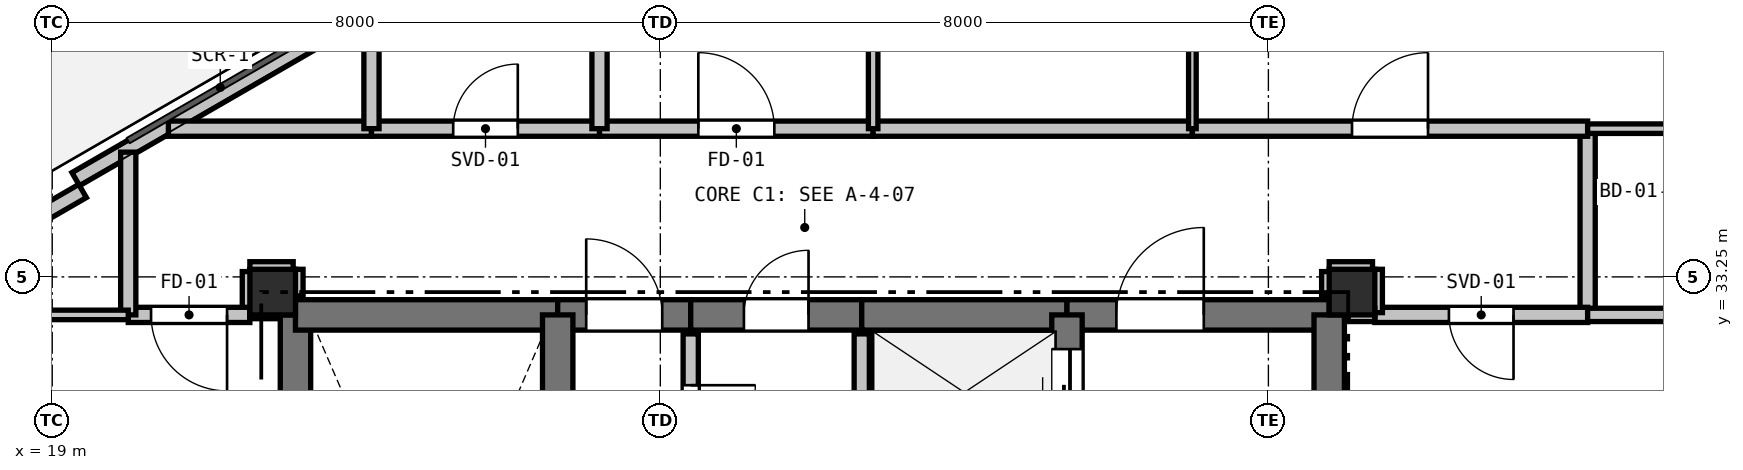
"""IFC4 building model, lengths in metres.
Left out: names, types, materials, properties, quantities, classifications, styles, units other than length and angle.
Written with IfcOpenShell. Run it as: python <this file> out.ifc"""

import sys

from ifc_helpers import new_model, si_unit, direction, frame, frame_2d, origin, origin_2d, place, context, subcontext, project, spatial, rectangle, extrude, element, fill, save


model = new_model("IFC4")
c1 = context("Model", 3, precision=1e-05, world=origin(), true_north=direction((0.0, 1.0)))
c2 = subcontext(c1, "Body", "Model", "MODEL_VIEW")
j1 = project(units=[si_unit("LENGTHUNIT", "METRE"), si_unit("PLANEANGLEUNIT", "RADIAN")], contexts=[c1])
p1 = place(None, origin())
s1 = spatial("IfcSite", under=j1, at=p1, CompositionType="ELEMENT")
p2 = place(p1, origin())
s2 = spatial("IfcBuilding", under=s1, at=p2, CompositionType="ELEMENT")
p3 = place(p2, frame((0.0, 0.0, 215.1)))
s3 = spatial("IfcBuildingStorey", under=s2, at=p3, CompositionType="ELEMENT", Elevation=215.1)
for number, where, z_axis, x_axis in (
    (1, (21.9, 33.05, 0.0), (0.0, 0.0, 1.0), (1.0, 0.0, 0.0)),
    (2, (36.1, 33.05, 0.0), (0.0, 0.0, 1.0), (1.0, 0.0, 0.0)),
):
    element("IfcColumn", number, at=place(p3, frame(where, z_axis=z_axis, x_axis=x_axis)), inside=s3, PredefinedType="COLUMN", context=c2, shape_type="SweptSolid", body=[
        extrude(rectangle(XDim=0.6, YDim=0.6, at=origin_2d()), origin(), (0.0, 0.0, 1.0), 3.3),
    ])
p4 = place(p3, frame((19.309, 34.536, 0.0), z_axis=(0.0, 0.0, 1.0), x_axis=(0.866020680503, 0.500008180874, 0.0)))
e3 = element("IfcWall", 3, at=p4, inside=s3, PredefinedType="PARAPET", context=c2, shape_type="SweptSolid", body=[
    extrude(rectangle(XDim=8.999, YDim=0.2, at=frame_2d((4.5, 0.0))), origin(), (0.0, 0.0, 1.0), 0.2),
])
p5 = place(p3, frame((17.927, 33.53, 0.0), z_axis=(0.0, 0.0, 1.0), x_axis=(0.86605165483, 0.499954529098, 0.0)))
e4 = element("IfcWall", 4, at=p5, inside=s3, PredefinedType="PARAPET", context=c2, shape_type="SweptSolid", body=[
    extrude(rectangle(XDim=1.7, YDim=0.2, at=frame_2d((0.85, 0.0))), origin(), (0.0, 0.0, 1.0), 2.64),
])
p6 = place(p3, frame((22.2, 25.4, 0.0), z_axis=(0.0, 0.0, 1.0), x_axis=(0.0, 1.0, 0.0)))
e5 = element("IfcWall", 5, at=p6, inside=s3, PredefinedType="SHEAR", context=c2, shape_type="SweptSolid", body=[
    extrude(rectangle(XDim=7.35, YDim=0.4, at=frame_2d((3.675, 0.0))), origin(), (0.0, 0.0, 1.0), 3.02),
])
p7 = place(p3, frame((22.2, 32.75, 0.0), z_axis=(0.0, 0.0, 1.0), x_axis=(1.0, 0.0, 0.0)))
e6 = element("IfcWall", 6, at=p7, inside=s3, PredefinedType="SHEAR", context=c2, shape_type="SweptSolid", body=[
    extrude(rectangle(XDim=3.45, YDim=0.4, at=frame_2d((1.725, 0.0))), origin(), (0.0, 0.0, 1.0), 3.02),
])
p8 = place(p3, frame((25.65, 32.75, 0.0), z_axis=(0.0, 0.0, 1.0), x_axis=(1.0, 0.0, 0.0)))
e7 = element("IfcWall", 7, at=p8, inside=s3, PredefinedType="SHEAR", context=c2, shape_type="SweptSolid", body=[
    extrude(rectangle(XDim=1.75, YDim=0.4, at=frame_2d((0.875, 0.0))), origin(), (0.0, 0.0, 1.0), 3.02),
])
p9 = place(p8, frame((0.375, 0.0, 0.0)))
e8 = element("IfcOpeningElement", 8, at=p9, cuts=e7, PredefinedType="OPENING", context=c2, shape_type="SweptSolid", body=[
    extrude(rectangle(XDim=1.0, YDim=2.15, at=frame_2d((0.5, 1.075))), frame((0.0, 0.21, 0.0), z_axis=(0.0, -1.0, 0.0), x_axis=(1.0, 0.0, 0.0)), (0.0, 0.0, 1.0), 0.42),
])
p10 = place(p3, frame((27.4, 32.75, 0.0), z_axis=(0.0, 0.0, 1.0), x_axis=(1.0, 0.0, 0.0)))
e9 = element("IfcWall", 9, at=p10, inside=s3, PredefinedType="SHEAR", context=c2, shape_type="SweptSolid", body=[
    extrude(rectangle(XDim=2.25, YDim=0.4, at=frame_2d((1.125, 0.0))), origin(), (0.0, 0.0, 1.0), 3.02),
])
p11 = place(p10, frame((0.7, 0.0, 0.0)))
e10 = element("IfcOpeningElement", 10, at=p11, cuts=e9, PredefinedType="OPENING", context=c2, shape_type="SweptSolid", body=[
    extrude(rectangle(XDim=0.85, YDim=2.1, at=frame_2d((0.425, 1.05))), frame((0.0, 0.21, 0.0), z_axis=(0.0, -1.0, 0.0), x_axis=(1.0, 0.0, 0.0)), (0.0, 0.0, 1.0), 0.42),
])
p12 = place(p3, frame((29.65, 32.75, 0.0), z_axis=(0.0, 0.0, 1.0), x_axis=(1.0, 0.0, 0.0)))
e11 = element("IfcWall", 11, at=p12, inside=s3, PredefinedType="SHEAR", context=c2, shape_type="SweptSolid", body=[
    extrude(rectangle(XDim=2.7, YDim=0.4, at=frame_2d((1.35, 0.0))), origin(), (0.0, 0.0, 1.0), 3.02),
])
p13 = place(p3, frame((32.35, 32.75, 0.0), z_axis=(0.0, 0.0, 1.0), x_axis=(1.0, 0.0, 0.0)))
e12 = element("IfcWall", 12, at=p13, inside=s3, PredefinedType="SHEAR", context=c2, shape_type="SweptSolid", body=[
    extrude(rectangle(XDim=3.45, YDim=0.4, at=frame_2d((1.725, 0.0))), origin(), (0.0, 0.0, 1.0), 3.02),
])
p14 = place(p13, frame((0.65, 0.0, 0.0)))
e13 = element("IfcOpeningElement", 13, at=p14, cuts=e12, PredefinedType="OPENING", context=c2, shape_type="SweptSolid", body=[
    extrude(rectangle(XDim=1.15, YDim=2.15, at=frame_2d((0.575, 1.075))), frame((0.0, 0.21, 0.0), z_axis=(0.0, -1.0, 0.0), x_axis=(1.0, 0.0, 0.0)), (0.0, 0.0, 1.0), 0.42),
])
p15 = place(p3, frame((35.8, 32.75, 0.0), z_axis=(0.0, 0.0, 1.0), x_axis=(0.0, -1.0, 0.0)))
e14 = element("IfcWall", 14, at=p15, inside=s3, PredefinedType="SHEAR", context=c2, shape_type="SweptSolid", body=[
    extrude(rectangle(XDim=4.65, YDim=0.4, at=frame_2d((2.325, 0.0))), origin(), (0.0, 0.0, 1.0), 3.02),
])
p16 = place(p3, frame((25.65, 27.95, 0.0), z_axis=(0.0, 0.0, 1.0), x_axis=(0.0, 1.0, 0.0)))
e15 = element("IfcWall", 15, at=p16, inside=s3, PredefinedType="SHEAR", context=c2, shape_type="SweptSolid", body=[
    extrude(rectangle(XDim=4.8, YDim=0.4, at=frame_2d((2.4, 0.0))), origin(), (0.0, 0.0, 1.0), 3.02),
])
p17 = place(p3, frame((32.35, 30.75, 0.0), z_axis=(0.0, 0.0, 1.0), x_axis=(0.0, 1.0, 0.0)))
e16 = element("IfcWall", 16, at=p17, inside=s3, PredefinedType="SHEAR", context=c2, shape_type="SweptSolid", body=[
    extrude(rectangle(XDim=2.0, YDim=0.4, at=frame_2d((1.0, 0.0))), origin(), (0.0, 0.0, 1.0), 3.02),
])
p18 = place(p17, frame((0.45, 0.0, 0.0)))
e17 = element("IfcOpeningElement", 17, at=p18, cuts=e16, PredefinedType="OPENING", context=c2, shape_type="SweptSolid", body=[
    extrude(rectangle(XDim=1.1, YDim=2.15, at=frame_2d((0.55, 1.075))), frame((0.0, 0.21, 0.0), z_axis=(0.0, -1.0, 0.0), x_axis=(1.0, 0.0, 0.0)), (0.0, 0.0, 1.0), 0.42),
])
p19 = place(p3, frame((29.65, 30.3, 0.0), z_axis=(0.0, 0.0, 1.0), x_axis=(0.0, 1.0, 0.0)))
e18 = element("IfcWall", 18, at=p19, inside=s3, PredefinedType="PARTITIONING", context=c2, shape_type="SweptSolid", body=[
    extrude(rectangle(XDim=2.2, YDim=0.2, at=frame_2d((1.1, 0.0))), origin(), (0.0, 0.0, 1.0), 3.02),
])
p20 = place(p3, frame((27.4, 32.5, 0.0), z_axis=(0.0, 0.0, 1.0), x_axis=(0.0, -1.0, 0.0)))
e19 = element("IfcWall", 19, at=p20, inside=s3, PredefinedType="PARTITIONING", context=c2, shape_type="SweptSolid", body=[
    extrude(rectangle(XDim=2.2, YDim=0.2, at=frame_2d((1.1, 0.0))), origin(), (0.0, 0.0, 1.0), 3.02),
])
p21 = place(p20, frame((0.675, 0.0, 0.0)))
e20 = element("IfcOpeningElement", 20, at=p21, cuts=e19, PredefinedType="OPENING", context=c2, shape_type="SweptSolid", body=[
    extrude(rectangle(XDim=0.85, YDim=2.1, at=frame_2d((0.425, 1.05))), frame((0.0, 0.11, 0.0), z_axis=(0.0, -1.0, 0.0), x_axis=(1.0, 0.0, 0.0)), (0.0, 0.0, 1.0), 0.22),
])
p22 = place(p3, frame((39.2, 35.2, 0.0), z_axis=(0.0, 0.0, 1.0), x_axis=(0.0, -1.0, 0.0)))
e21 = element("IfcWall", 21, at=p22, inside=s3, PredefinedType="PARTITIONING", context=c2, shape_type="SweptSolid", body=[
    extrude(rectangle(XDim=2.45, YDim=0.2, at=frame_2d((1.225, 0.0))), origin(), (0.0, 0.0, 1.0), 3.02),
])
p23 = place(p3, frame((39.2, 32.75, 0.0), z_axis=(0.0, 0.0, 1.0), x_axis=(-1.0, 0.0, 0.0)))
e22 = element("IfcWall", 22, at=p23, inside=s3, PredefinedType="PARTITIONING", context=c2, shape_type="SweptSolid", body=[
    extrude(rectangle(XDim=2.8, YDim=0.2, at=frame_2d((1.4, 0.0))), origin(), (0.0, 0.0, 1.0), 3.02),
])
p24 = place(p23, frame((0.975, 0.0, 0.0)))
e23 = element("IfcOpeningElement", 23, at=p24, cuts=e22, PredefinedType="OPENING", context=c2, shape_type="SweptSolid", body=[
    extrude(rectangle(XDim=0.85, YDim=2.1, at=frame_2d((0.425, 1.05))), frame((0.0, 0.11, 0.0), z_axis=(0.0, -1.0, 0.0), x_axis=(1.0, 0.0, 0.0)), (0.0, 0.0, 1.0), 0.22),
])
for number, where, z_axis, x_axis in (
    (24, (36.4, 32.78, 0.0), (0.0, 0.0, 1.0), (0.0, 1.0, 0.0)),
    (25, (36.37, 33.35, 0.0), (0.0, 0.0, 1.0), (-1.0, 0.0, 0.0)),
):
    element("IfcWall", number, at=place(p3, frame(where, z_axis=z_axis, x_axis=x_axis)), inside=s3, PredefinedType="PARTITIONING", context=c2, shape_type="SweptSolid", body=[
        extrude(rectangle(XDim=0.57, YDim=0.2, at=frame_2d((0.285, 0.0))), origin(), (0.0, 0.0, 1.0), 2.468),
    ])
p25 = place(p3, frame((35.8, 33.32, 0.0), z_axis=(0.0, 0.0, 1.0), x_axis=(0.0, -1.0, 0.0)))
e26 = element("IfcWall", 26, at=p25, inside=s3, PredefinedType="PARTITIONING", context=c2, shape_type="SweptSolid", body=[
    extrude(rectangle(XDim=0.32, YDim=0.2, at=frame_2d((0.16, 0.0))), origin(), (0.0, 0.0, 1.0), 2.545),
])
p26 = place(p3, frame((22.2, 33.0, 0.0), z_axis=(0.0, 0.0, 1.0), x_axis=(0.0, 1.0, 0.0)))
e27 = element("IfcWall", 27, at=p26, inside=s3, PredefinedType="PARTITIONING", context=c2, shape_type="SweptSolid", body=[
    extrude(rectangle(XDim=0.35, YDim=0.2, at=frame_2d((0.175, 0.0))), origin(), (0.0, 0.0, 1.0), 2.545),
])
p27 = place(p3, frame((22.17, 33.35, 0.0), z_axis=(0.0, 0.0, 1.0), x_axis=(-1.0, 0.0, 0.0)))
e28 = element("IfcWall", 28, at=p27, inside=s3, PredefinedType="PARTITIONING", context=c2, shape_type="SweptSolid", body=[
    extrude(rectangle(XDim=0.57, YDim=0.2, at=frame_2d((0.285, 0.0))), origin(), (0.0, 0.0, 1.0), 3.02),
])
p28 = place(p3, frame((21.6, 33.32, 0.0), z_axis=(0.0, 0.0, 1.0), x_axis=(0.0, -1.0, 0.0)))
e29 = element("IfcWall", 29, at=p28, inside=s3, PredefinedType="PARTITIONING", context=c2, shape_type="SweptSolid", body=[
    extrude(rectangle(XDim=0.57, YDim=0.2, at=frame_2d((0.285, 0.0))), origin(), (0.0, 0.0, 1.0), 2.468),
])
p29 = place(p3, frame((21.6, 32.75, 0.0), z_axis=(0.0, 0.0, 1.0), x_axis=(-1.0, 0.0, 0.0)))
e30 = element("IfcWall", 30, at=p29, inside=s3, PredefinedType="PARTITIONING", context=c2, shape_type="SweptSolid", body=[
    extrude(rectangle(XDim=1.6, YDim=0.2, at=frame_2d((0.8, 0.0))), origin(), (0.0, 0.0, 1.0), 2.468),
])
p30 = place(p29, frame((0.3, 0.0, 0.0)))
e31 = element("IfcOpeningElement", 31, at=p30, cuts=e30, PredefinedType="OPENING", context=c2, shape_type="SweptSolid", body=[
    extrude(rectangle(XDim=1.0, YDim=2.15, at=frame_2d((0.5, 1.075))), frame((0.0, 0.11, 0.0), z_axis=(0.0, -1.0, 0.0), x_axis=(1.0, 0.0, 0.0)), (0.0, 0.0, 1.0), 0.22),
])
p31 = place(p3, frame((20.0, 32.75, 0.0), z_axis=(0.0, 0.0, 1.0), x_axis=(0.0, 1.0, 0.0)))
e32 = element("IfcWall", 32, at=p31, inside=s3, PredefinedType="PARTITIONING", context=c2, shape_type="SweptSolid", body=[
    extrude(rectangle(XDim=2.141, YDim=0.2, at=frame_2d((1.071, 0.0))), origin(), (0.0, 0.0, 1.0), 2.365),
])
p32 = place(p3, frame((20.528, 35.2, 0.0), z_axis=(0.0, 0.0, 1.0), x_axis=(1.0, 0.0, 0.0)))
e33 = element("IfcWall", 33, at=p32, inside=s3, PredefinedType="PARTITIONING", context=c2, shape_type="SweptSolid", body=[
    extrude(rectangle(XDim=2.672, YDim=0.2, at=frame_2d((1.336, 0.0))), origin(), (0.0, 0.0, 1.0), 2.365),
])
p33 = place(p3, frame((23.2, 35.2, 0.0), z_axis=(0.0, 0.0, 1.0), x_axis=(1.0, 0.0, 0.0)))
e34 = element("IfcWall", 34, at=p33, inside=s3, PredefinedType="PARTITIONING", context=c2, shape_type="SweptSolid", body=[
    extrude(rectangle(XDim=3.0, YDim=0.2, at=frame_2d((1.5, 0.0))), origin(), (0.0, 0.0, 1.0), 3.02),
])
p34 = place(p33, frame((1.075, 0.0, 0.0)))
e35 = element("IfcOpeningElement", 35, at=p34, cuts=e34, PredefinedType="OPENING", context=c2, shape_type="SweptSolid", body=[
    extrude(rectangle(XDim=0.85, YDim=2.1, at=frame_2d((0.425, 1.05))), frame((0.0, 0.11, 0.0), z_axis=(0.0, -1.0, 0.0), x_axis=(1.0, 0.0, 0.0)), (0.0, 0.0, 1.0), 0.22),
])
p35 = place(p3, frame((26.2, 35.2, 0.0), z_axis=(0.0, 0.0, 1.0), x_axis=(1.0, 0.0, 0.0)))
e36 = element("IfcWall", 36, at=p35, inside=s3, PredefinedType="PARTITIONING", context=c2, shape_type="SweptSolid", body=[
    extrude(rectangle(XDim=3.6, YDim=0.2, at=frame_2d((1.8, 0.0))), origin(), (0.0, 0.0, 1.0), 3.02),
])
p36 = place(p35, frame((1.3, 0.0, 0.0)))
e37 = element("IfcOpeningElement", 37, at=p36, cuts=e36, PredefinedType="OPENING", context=c2, shape_type="SweptSolid", body=[
    extrude(rectangle(XDim=1.0, YDim=2.15, at=frame_2d((0.5, 1.075))), frame((0.0, 0.11, 0.0), z_axis=(0.0, -1.0, 0.0), x_axis=(1.0, 0.0, 0.0)), (0.0, 0.0, 1.0), 0.22),
])
p37 = place(p3, frame((29.8, 35.2, 0.0), z_axis=(0.0, 0.0, 1.0), x_axis=(1.0, 0.0, 0.0)))
e38 = element("IfcWall", 38, at=p37, inside=s3, PredefinedType="PARTITIONING", context=c2, shape_type="SweptSolid", body=[
    extrude(rectangle(XDim=4.2, YDim=0.2, at=frame_2d((2.1, 0.0))), origin(), (0.0, 0.0, 1.0), 3.02),
])
p38 = place(p3, frame((34.0, 35.2, 0.0), z_axis=(0.0, 0.0, 1.0), x_axis=(1.0, 0.0, 0.0)))
e39 = element("IfcWall", 39, at=p38, inside=s3, PredefinedType="PARTITIONING", context=c2, shape_type="SweptSolid", body=[
    extrude(rectangle(XDim=5.2, YDim=0.2, at=frame_2d((2.6, 0.0))), origin(), (0.0, 0.0, 1.0), 2.468),
])
p39 = place(p38, frame((2.1, 0.0, 0.0)))
e40 = element("IfcOpeningElement", 40, at=p39, cuts=e39, PredefinedType="OPENING", context=c2, shape_type="SweptSolid", body=[
    extrude(rectangle(XDim=1.0, YDim=2.15, at=frame_2d((0.5, 1.075))), frame((0.0, 0.11, 0.0), z_axis=(0.0, -1.0, 0.0), x_axis=(1.0, 0.0, 0.0)), (0.0, 0.0, 1.0), 0.22),
])
p40 = place(p3, frame((36.05, 32.75, 0.0), z_axis=(0.0, 0.0, 1.0), x_axis=(1.0, 0.0, 0.0)))
e41 = element("IfcWall", 41, at=p40, inside=s3, PredefinedType="PLUMBINGWALL", context=c2, shape_type="SweptSolid", body=[
    extrude(rectangle(XDim=0.35, YDim=0.175, at=frame_2d((0.175, 0.0))), origin(), (0.0, 0.0, 1.0), 2.545),
])
p41 = place(p3, frame((39.2, 32.75, 0.0), z_axis=(0.0, 0.0, 1.0), x_axis=(1.0, 0.0, 0.0)))
e42 = element("IfcWall", 42, at=p41, inside=s3, PredefinedType="PLUMBINGWALL", context=c2, shape_type="SweptSolid", body=[
    extrude(rectangle(XDim=1.084, YDim=0.175, at=frame_2d((0.542, 0.0))), origin(), (0.0, 0.0, 1.0), 2.365),
])
p42 = place(p3, frame((16.464, 32.75, 0.0), z_axis=(0.0, 0.0, 1.0), x_axis=(1.0, 0.0, 0.0)))
e43 = element("IfcWall", 43, at=p42, inside=s3, PredefinedType="PARTITIONING", context=c2, shape_type="SweptSolid", body=[
    extrude(rectangle(XDim=3.536, YDim=0.125, at=frame_2d((1.768, 0.0))), origin(), (0.0, 0.0, 1.0), 2.365),
])
p43 = place(p3, frame((21.6, 32.75, 0.0), z_axis=(0.0, 0.0, 1.0), x_axis=(1.0, 0.0, 0.0)))
e44 = element("IfcWall", 44, at=p43, inside=s3, PredefinedType="PARTITIONING", context=c2, shape_type="SweptSolid", body=[
    extrude(rectangle(XDim=0.35, YDim=0.1, at=frame_2d((0.175, 0.0))), origin(), (0.0, 0.0, 1.0), 2.545),
])
p44 = place(p3, frame((26.2, 37.5, 0.0), z_axis=(0.0, 0.0, 1.0), x_axis=(0.0, -1.0, 0.0)))
e45 = element("IfcWall", 45, at=p44, inside=s3, PredefinedType="PARTITIONING", context=c2, shape_type="SweptSolid", body=[
    extrude(rectangle(XDim=2.3, YDim=0.2, at=frame_2d((1.15, 0.0))), origin(), (0.0, 0.0, 1.0), 3.02),
])
p45 = place(p3, frame((23.2, 35.2, 0.0), z_axis=(0.0, 0.0, 1.0), x_axis=(0.0, 1.0, 0.0)))
e46 = element("IfcWall", 46, at=p45, inside=s3, PredefinedType="PARTITIONING", context=c2, shape_type="SweptSolid", body=[
    extrude(rectangle(XDim=1.539, YDim=0.2, at=frame_2d((0.769, 0.0))), origin(), (0.0, 0.0, 1.0), 2.365),
])
p46 = place(p3, frame((29.8, 37.5, 0.0), z_axis=(0.0, 0.0, 1.0), x_axis=(0.0, -1.0, 0.0)))
e47 = element("IfcWall", 47, at=p46, inside=s3, PredefinedType="PARTITIONING", context=c2, shape_type="SweptSolid", body=[
    extrude(rectangle(XDim=2.3, YDim=0.125, at=frame_2d((1.15, 0.0))), origin(), (0.0, 0.0, 1.0), 3.02),
])
p47 = place(p3, frame((40.452, 35.2, 0.0), z_axis=(0.0, 0.0, 1.0), x_axis=(-1.0, 0.0, 0.0)))
e48 = element("IfcWall", 48, at=p47, inside=s3, PredefinedType="PARTITIONING", context=c2, shape_type="SweptSolid", body=[
    extrude(rectangle(XDim=1.252, YDim=0.125, at=frame_2d((0.626, 0.0))), origin(), (0.0, 0.0, 1.0), 2.365),
])
p48 = place(p3, frame((34.0, 35.2, 0.0), z_axis=(0.0, 0.0, 1.0), x_axis=(0.0, 1.0, 0.0)))
e49 = element("IfcWall", 49, at=p48, inside=s3, PredefinedType="PARTITIONING", context=c2, shape_type="SweptSolid", body=[
    extrude(rectangle(XDim=2.3, YDim=0.1, at=frame_2d((1.15, 0.0))), origin(), (0.0, 0.0, 1.0), 3.02),
])
p49 = place(p9, origin())
e50 = element("IfcDoor", 50, at=p49, inside=s3, OperationType="SINGLE_SWING_LEFT", PredefinedType="DOOR", context=c2, shape_type="SweptSolid", body=[
    extrude(rectangle(XDim=1.0, YDim=2.15, at=frame_2d((0.5, 1.075))), frame((0.0, 0.025, 0.0), z_axis=(0.0, -1.0, 0.0), x_axis=(1.0, 0.0, 0.0)), (0.0, 0.0, 1.0), 0.05),
])
fill(e8, e50)
p50 = place(p18, origin())
e51 = element("IfcDoor", 51, at=p50, inside=s3, OperationType="SLIDING_TO_LEFT", PredefinedType="DOOR", context=c2, shape_type="SweptSolid", body=[
    extrude(rectangle(XDim=1.1, YDim=2.15, at=frame_2d((0.55, 1.075))), frame((0.0, 0.025, 0.0), z_axis=(0.0, -1.0, 0.0), x_axis=(1.0, 0.0, 0.0)), (0.0, 0.0, 1.0), 0.05),
])
fill(e17, e51)
p51 = place(p14, origin())
e52 = element("IfcDoor", 52, at=p51, inside=s3, OperationType="SINGLE_SWING_RIGHT", PredefinedType="DOOR", context=c2, shape_type="SweptSolid", body=[
    extrude(rectangle(XDim=1.15, YDim=2.15, at=frame_2d((0.575, 1.075))), frame((0.0, 0.025, 0.0), z_axis=(0.0, -1.0, 0.0), x_axis=(1.0, 0.0, 0.0)), (0.0, 0.0, 1.0), 0.05),
])
fill(e13, e52)
p52 = place(p21, origin())
e53 = element("IfcDoor", 53, at=p52, inside=s3, OperationType="SINGLE_SWING_LEFT", PredefinedType="DOOR", context=c2, shape_type="SweptSolid", body=[
    extrude(rectangle(XDim=0.85, YDim=2.1, at=frame_2d((0.425, 1.05))), frame((0.0, 0.025, 0.0), z_axis=(0.0, -1.0, 0.0), x_axis=(1.0, 0.0, 0.0)), (0.0, 0.0, 1.0), 0.05),
])
fill(e20, e53)
p53 = place(p24, origin())
e54 = element("IfcDoor", 54, at=p53, inside=s3, OperationType="SINGLE_SWING_LEFT", PredefinedType="DOOR", context=c2, shape_type="SweptSolid", body=[
    extrude(rectangle(XDim=0.85, YDim=2.1, at=frame_2d((0.425, 1.05))), frame((0.0, 0.025, 0.0), z_axis=(0.0, -1.0, 0.0), x_axis=(1.0, 0.0, 0.0)), (0.0, 0.0, 1.0), 0.05),
])
fill(e23, e54)
p54 = place(p11, origin())
e55 = element("IfcDoor", 55, at=p54, inside=s3, OperationType="SINGLE_SWING_RIGHT", PredefinedType="DOOR", context=c2, shape_type="SweptSolid", body=[
    extrude(rectangle(XDim=0.85, YDim=2.1, at=frame_2d((0.425, 1.05))), frame((0.0, 0.025, 0.0), z_axis=(0.0, -1.0, 0.0), x_axis=(1.0, 0.0, 0.0)), (0.0, 0.0, 1.0), 0.05),
])
fill(e10, e55)
p55 = place(p30, origin())
e56 = element("IfcDoor", 56, at=p55, inside=s3, OperationType="SINGLE_SWING_LEFT", PredefinedType="DOOR", context=c2, shape_type="SweptSolid", body=[
    extrude(rectangle(XDim=1.0, YDim=2.15, at=frame_2d((0.5, 1.075))), frame((0.0, 0.025, 0.0), z_axis=(0.0, -1.0, 0.0), x_axis=(1.0, 0.0, 0.0)), (0.0, 0.0, 1.0), 0.05),
])
fill(e31, e56)
p56 = place(p34, origin())
e57 = element("IfcDoor", 57, at=p56, inside=s3, OperationType="SINGLE_SWING_RIGHT", PredefinedType="DOOR", context=c2, shape_type="SweptSolid", body=[
    extrude(rectangle(XDim=0.85, YDim=2.1, at=frame_2d((0.425, 1.05))), frame((0.0, 0.025, 0.0), z_axis=(0.0, -1.0, 0.0), x_axis=(1.0, 0.0, 0.0)), (0.0, 0.0, 1.0), 0.05),
])
fill(e35, e57)
p57 = place(p36, origin())
e58 = element("IfcDoor", 58, at=p57, inside=s3, OperationType="SINGLE_SWING_LEFT", PredefinedType="DOOR", context=c2, shape_type="SweptSolid", body=[
    extrude(rectangle(XDim=1.0, YDim=2.15, at=frame_2d((0.5, 1.075))), frame((0.0, 0.025, 0.0), z_axis=(0.0, -1.0, 0.0), x_axis=(1.0, 0.0, 0.0)), (0.0, 0.0, 1.0), 0.05),
])
fill(e37, e58)
p58 = place(p39, origin())
e59 = element("IfcDoor", 59, at=p58, inside=s3, OperationType="SINGLE_SWING_RIGHT", PredefinedType="DOOR", context=c2, shape_type="SweptSolid", body=[
    extrude(rectangle(XDim=1.0, YDim=2.15, at=frame_2d((0.5, 1.075))), frame((0.0, 0.025, 0.0), z_axis=(0.0, -1.0, 0.0), x_axis=(1.0, 0.0, 0.0)), (0.0, 0.0, 1.0), 0.05),
])
fill(e40, e59)
save(model, sys.argv[1])
